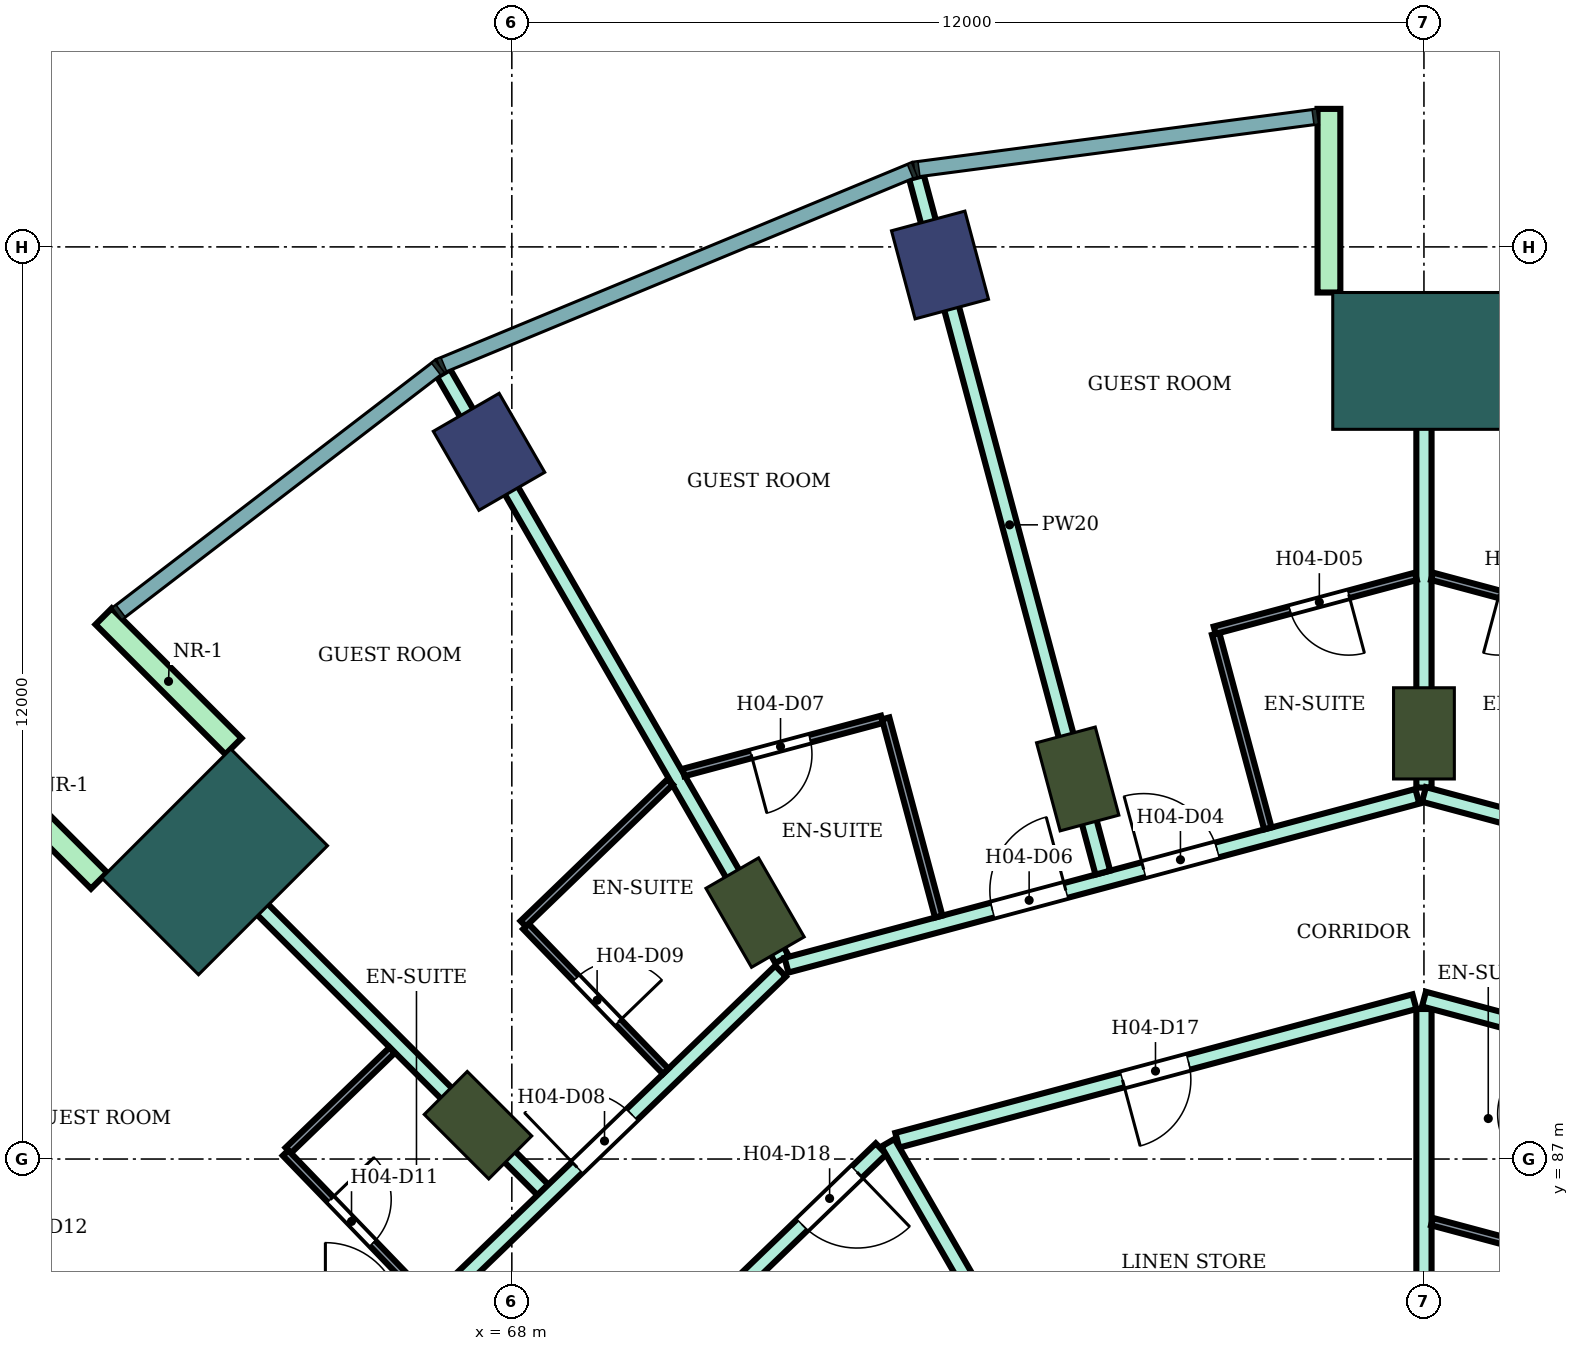
"""IFC4 building model, lengths in metres.
Left out: names, types, materials, properties, quantities, classifications, styles, units other than length and angle.
Written with IfcOpenShell. Run it as: python <this file> out.ifc"""

import sys

from ifc_helpers import new_model, si_unit, direction, frame, frame_2d, origin, origin_2d, place, context, subcontext, project, spatial, rectangle, extrude, element, fill, save


model = new_model("IFC4")
c1 = context("Model", 3, precision=1e-05, world=origin(), true_north=direction((0.0, 1.0)))
c2 = subcontext(c1, "Body", "Model", "MODEL_VIEW")
j1 = project(units=[si_unit("LENGTHUNIT", "METRE"), si_unit("PLANEANGLEUNIT", "RADIAN")], contexts=[c1])
p1 = place(None, origin())
s1 = spatial("IfcSite", under=j1, at=p1, CompositionType="ELEMENT")
p2 = place(p1, origin())
s2 = spatial("IfcBuilding", under=s1, at=p2, CompositionType="ELEMENT")
p3 = place(p2, frame((0.0, 0.0, 66.8)))
s3 = spatial("IfcBuildingStorey", under=s2, at=p3, CompositionType="ELEMENT", Elevation=66.8)
for number, where, z_axis, x_axis in (
    (1, (73.633, 98.762, 0.0), (0.0, 0.0, 1.0), (-0.259, 0.966, 0.0)),
    (2, (67.7, 96.304, 0.0), (0.0, 0.0, 1.0), (-0.5, 0.866, 0.0)),
):
    element("IfcColumn", number, at=place(p3, frame(where, z_axis=z_axis, x_axis=x_axis)), inside=s3, PredefinedType="COLUMN", context=c2, shape_type="SweptSolid", body=[
        extrude(rectangle(XDim=1.2, YDim=1.0, at=origin_2d()), origin(), (0.0, 0.0, 1.0), 3.8),
    ])
for number, where, z_axis, x_axis in (
    (3, (80.0, 92.6, 0.0), (0.0, 0.0, 1.0), (0.0, 1.0, 0.0)),
    (4, (75.445, 92.0, 0.0), (0.0, 0.0, 1.0), (-0.259, 0.966, 0.0)),
    (5, (71.2, 90.242, 0.0), (0.0, 0.0, 1.0), (-0.5, 0.866, 0.0)),
    (6, (67.555, 87.445, 0.0), (0.0, 0.0, 1.0), (-0.707, 0.707, 0.0)),
):
    element("IfcColumn", number, at=place(p3, frame(where, z_axis=z_axis, x_axis=x_axis)), inside=s3, PredefinedType="COLUMN", context=c2, shape_type="SweptSolid", body=[
        extrude(rectangle(XDim=1.2, YDim=0.8, at=origin_2d()), origin(), (0.0, 0.0, 1.0), 3.8),
    ])
for number, where, z_axis, x_axis in (
    (7, (80.0, 97.5, 0.0), (0.0, 0.0, 1.0), (0.0, 1.0, 0.0)),
    (8, (64.09, 90.91, 0.0), (0.0, 0.0, 1.0), (-0.707, 0.707, 0.0)),
):
    element("IfcColumn", number, at=place(p3, frame(where, z_axis=z_axis, x_axis=x_axis)), inside=s3, PredefinedType="COLUMN", context=c2, shape_type="SweptSolid", body=[
        extrude(rectangle(XDim=1.8, YDim=2.4, at=origin_2d()), origin(), (0.0, 0.0, 1.0), 3.8),
    ])
for number, where, z_axis, x_axis in (
    (9, (78.75, 98.4, 0.0), (0.0, 0.0, 1.0), (0.0, 1.0, 0.0)),
    (10, (64.338, 92.43, 0.0), (0.0, 0.0, 1.0), (-0.707, 0.707, 0.0)),
    (11, (62.57, 90.662, 0.0), (0.0, 0.0, 1.0), (-0.707, 0.707, 0.0)),
):
    element("IfcWall", number, at=place(p3, frame(where, z_axis=z_axis, x_axis=x_axis)), inside=s3, PredefinedType="NOTDEFINED", context=c2, shape_type="SweptSolid", body=[
        extrude(rectangle(XDim=2.416, YDim=0.3, at=frame_2d((1.208, 0.0))), origin(), (0.0, 0.0, 1.0), 3.8),
    ])
p4 = place(p3, frame((63.598, 91.407, 0.0), z_axis=(0.0, 0.0, 1.0), x_axis=(0.706981202484, -0.707232337591, 0.0)))
e12 = element("IfcWall", 12, at=p4, inside=s3, PredefinedType="PARTITIONING", context=c2, shape_type="SweptSolid", body=[
    extrude(rectangle(XDim=6.805, YDim=0.2, at=frame_2d((3.402, 0.0))), origin(), (0.0, 0.0, 1.0), 3.35),
])
p5 = place(p3, frame((66.797, 84.9, 0.0), z_axis=(0.0, 0.0, 1.0), x_axis=(0.719692092412, 0.694293376116, 0.0)))
e13 = element("IfcWall", 13, at=p5, inside=s3, PredefinedType="PARTITIONING", context=c2, shape_type="SweptSolid", body=[
    extrude(rectangle(XDim=6.584, YDim=0.2, at=frame_2d((3.292, 0.0))), origin(), (0.0, 0.0, 1.0), 3.35),
])
p6 = place(p5, frame((2.866, 0.0, 0.0)))
e14 = element("IfcOpeningElement", 14, at=p6, cuts=e13, PredefinedType="OPENING", context=c2, shape_type="SweptSolid", body=[
    extrude(rectangle(XDim=1.0, YDim=2.1, at=frame_2d((0.5, 1.05))), frame((0.0, 0.11, 0.0), z_axis=(0.0, -1.0, 0.0), x_axis=(1.0, 0.0, 0.0)), (0.0, 0.0, 1.0), 0.22),
])
p7 = place(p3, frame((67.101, 97.342, 0.0), z_axis=(0.0, 0.0, 1.0), x_axis=(0.499932813297, -0.866064190571, 0.0)))
e15 = element("IfcWall", 15, at=p7, inside=s3, PredefinedType="PARTITIONING", context=c2, shape_type="SweptSolid", body=[
    extrude(rectangle(XDim=8.908, YDim=0.2, at=frame_2d((4.454, 0.0))), origin(), (0.0, 0.0, 1.0), 3.35),
])
p8 = place(p3, frame((68.987, 83.4, 0.0), z_axis=(0.0, 0.0, 1.0), x_axis=(0.719591503389, 0.694397629784, 0.0)))
e16 = element("IfcWall", 16, at=p8, inside=s3, PredefinedType="PARTITIONING", context=c2, shape_type="SweptSolid", body=[
    extrude(rectangle(XDim=5.378, YDim=0.2, at=frame_2d((2.689, 0.0))), origin(), (0.0, 0.0, 1.0), 3.35),
])
p9 = place(p8, frame((3.938, 0.0, 0.0)))
e17 = element("IfcOpeningElement", 17, at=p9, cuts=e16, PredefinedType="OPENING", context=c2, shape_type="SweptSolid", body=[
    extrude(rectangle(XDim=1.0, YDim=2.1, at=frame_2d((0.5, 1.05))), frame((0.0, 0.11, 0.0), z_axis=(0.0, -1.0, 0.0), x_axis=(1.0, 0.0, 0.0)), (0.0, 0.0, 1.0), 0.22),
])
p10 = place(p3, frame((71.614, 89.55, 0.0), z_axis=(0.0, 0.0, 1.0), x_axis=(0.965982156828, 0.258608725086, 0.0)))
e18 = element("IfcWall", 18, at=p10, inside=s3, PredefinedType="PARTITIONING", context=c2, shape_type="SweptSolid", body=[
    extrude(rectangle(XDim=8.592, YDim=0.2, at=frame_2d((4.296, 0.0))), origin(), (0.0, 0.0, 1.0), 3.35),
])
p11 = place(p10, frame((4.865, 0.0, 0.0)))
e19 = element("IfcOpeningElement", 19, at=p11, cuts=e18, PredefinedType="OPENING", context=c2, shape_type="SweptSolid", body=[
    extrude(rectangle(XDim=1.0, YDim=2.1, at=frame_2d((0.5, 1.05))), frame((0.0, 0.11, 0.0), z_axis=(0.0, -1.0, 0.0), x_axis=(1.0, 0.0, 0.0)), (0.0, 0.0, 1.0), 0.22),
])
p12 = place(p10, frame((2.804, 0.0, 0.0)))
e20 = element("IfcOpeningElement", 20, at=p12, cuts=e18, PredefinedType="OPENING", context=c2, shape_type="SweptSolid", body=[
    extrude(rectangle(XDim=1.0, YDim=2.1, at=frame_2d((0.5, 1.05))), frame((0.0, 0.11, 0.0), z_axis=(0.0, -1.0, 0.0), x_axis=(1.0, 0.0, 0.0)), (0.0, 0.0, 1.0), 0.22),
])
p13 = place(p3, frame((73.071, 87.247, 0.0), z_axis=(0.0, 0.0, 1.0), x_axis=(0.965914318977, 0.258861987157, 0.0)))
e21 = element("IfcWall", 21, at=p13, inside=s3, PredefinedType="PARTITIONING", context=c2, shape_type="SweptSolid", body=[
    extrude(rectangle(XDim=7.043, YDim=0.2, at=frame_2d((3.521, 0.0))), origin(), (0.0, 0.0, 1.0), 3.35),
])
p14 = place(p13, frame((3.067, 0.0, 0.0)))
e22 = element("IfcOpeningElement", 22, at=p14, cuts=e21, PredefinedType="OPENING", context=c2, shape_type="SweptSolid", body=[
    extrude(rectangle(XDim=0.9, YDim=2.1, at=frame_2d((0.45, 1.05))), frame((0.0, 0.11, 0.0), z_axis=(0.0, -1.0, 0.0), x_axis=(1.0, 0.0, 0.0)), (0.0, 0.0, 1.0), 0.22),
])
p15 = place(p3, frame((72.948, 87.214, 0.0), z_axis=(0.0, 0.0, 1.0), x_axis=(0.499927021214, -0.866067534006, 0.0)))
e23 = element("IfcWall", 23, at=p15, inside=s3, PredefinedType="PARTITIONING", context=c2, shape_type="SweptSolid", body=[
    extrude(rectangle(XDim=6.405, YDim=0.2, at=frame_2d((3.203, 0.0))), origin(), (0.0, 0.0, 1.0), 3.35),
])
p16 = place(p3, frame((73.323, 99.919, 0.0), z_axis=(0.0, 0.0, 1.0), x_axis=(0.258817230439, -0.965926312525, 0.0)))
e24 = element("IfcWall", 24, at=p16, inside=s3, PredefinedType="PARTITIONING", context=c2, shape_type="SweptSolid", body=[
    extrude(rectangle(XDim=9.474, YDim=0.2, at=frame_2d((4.737, 0.0))), origin(), (0.0, 0.0, 1.0), 3.35),
])
p17 = place(p3, frame((80.0, 82.699, 0.0), z_axis=(0.0, 0.0, 1.0), x_axis=(0.0, 1.0, 0.0)))
e25 = element("IfcWall", 25, at=p17, inside=s3, PredefinedType="PARTITIONING", context=c2, shape_type="SweptSolid", body=[
    extrude(rectangle(XDim=6.275, YDim=0.2, at=frame_2d((3.138, 0.0))), origin(), (0.0, 0.0, 1.0), 3.35),
])
p18 = place(p3, frame((80.0, 89.104, 0.0), z_axis=(0.0, 0.0, 1.0), x_axis=(0.965854247166, -0.25908603442, 0.0)))
e26 = element("IfcWall", 26, at=p18, inside=s3, PredefinedType="PARTITIONING", context=c2, shape_type="SweptSolid", body=[
    extrude(rectangle(XDim=7.183, YDim=0.2, at=frame_2d((3.592, 0.0))), origin(), (0.0, 0.0, 1.0), 3.35),
])
p19 = place(p18, frame((5.763, 0.0, 0.0)))
e27 = element("IfcOpeningElement", 27, at=p19, cuts=e26, PredefinedType="OPENING", context=c2, shape_type="SweptSolid", body=[
    extrude(rectangle(XDim=1.0, YDim=2.1, at=frame_2d((0.5, 1.05))), frame((0.0, 0.11, 0.0), z_axis=(0.0, -1.0, 0.0), x_axis=(1.0, 0.0, 0.0)), (0.0, 0.0, 1.0), 0.22),
])
p20 = place(p3, frame((80.0, 91.886, 0.0), z_axis=(0.0, 0.0, 1.0), x_axis=(0.0, 1.0, 0.0)))
e28 = element("IfcWall", 28, at=p20, inside=s3, PredefinedType="PARTITIONING", context=c2, shape_type="SweptSolid", body=[
    extrude(rectangle(XDim=6.314, YDim=0.2, at=frame_2d((3.157, 0.0))), origin(), (0.0, 0.0, 1.0), 3.35),
])
p21 = place(p3, frame((80.0, 91.796, 0.0), z_axis=(0.0, 0.0, 1.0), x_axis=(0.965891796243, -0.258946013582, 0.0)))
e29 = element("IfcWall", 29, at=p21, inside=s3, PredefinedType="PARTITIONING", context=c2, shape_type="SweptSolid", body=[
    extrude(rectangle(XDim=8.642, YDim=0.2, at=frame_2d((4.321, 0.0))), origin(), (0.0, 0.0, 1.0), 3.35),
])
p22 = place(p21, frame((2.817, 0.0, 0.0)))
e30 = element("IfcOpeningElement", 30, at=p22, cuts=e29, PredefinedType="OPENING", context=c2, shape_type="SweptSolid", body=[
    extrude(rectangle(XDim=1.0, YDim=2.1, at=frame_2d((0.5, 1.05))), frame((0.0, 0.11, 0.0), z_axis=(0.0, -1.0, 0.0), x_axis=(1.0, 0.0, 0.0)), (0.0, 0.0, 1.0), 0.22),
])
p23 = place(p3, frame((57.659, 87.899, 0.0), z_axis=(0.0, 0.0, 1.0), x_axis=(0.86602264145, -0.500004784474, 0.0)))
e31 = element("IfcWall", 31, at=p23, inside=s3, PredefinedType="PARTITIONING", context=c2, shape_type="SweptSolid", body=[
    extrude(rectangle(XDim=8.708, YDim=0.1, at=frame_2d((4.354, 0.0))), origin(), (0.0, 0.0, 1.0), 3.35),
])
p24 = place(p23, frame((3.929, 0.0, 0.0)))
e32 = element("IfcOpeningElement", 32, at=p24, cuts=e31, PredefinedType="OPENING", context=c2, shape_type="SweptSolid", body=[
    extrude(rectangle(XDim=0.9, YDim=2.1, at=frame_2d((0.45, 1.05))), frame((0.0, 0.06, 0.0), z_axis=(0.0, -1.0, 0.0), x_axis=(1.0, 0.0, 0.0)), (0.0, 0.0, 1.0), 0.12),
])
p25 = place(p3, frame((65.059, 87.114, 0.0), z_axis=(0.0, 0.0, 1.0), x_axis=(0.719715847356, 0.694268751324, 0.0)))
e33 = element("IfcWall", 33, at=p25, inside=s3, PredefinedType="PARTITIONING", context=c2, shape_type="SweptSolid", body=[
    extrude(rectangle(XDim=1.9, YDim=0.1, at=frame_2d((0.95, 0.0))), origin(), (0.0, 0.0, 1.0), 3.35),
])
p26 = place(p3, frame((65.023, 87.079, 0.0), z_axis=(0.0, 0.0, 1.0), x_axis=(0.694287838235, -0.719697434815, 0.0)))
e34 = element("IfcWall", 34, at=p26, inside=s3, PredefinedType="PARTITIONING", context=c2, shape_type="SweptSolid", body=[
    extrude(rectangle(XDim=2.7, YDim=0.1, at=frame_2d((1.35, 0.0))), origin(), (0.0, 0.0, 1.0), 3.35),
])
p27 = place(p26, frame((0.85, 0.0, 0.0)))
e35 = element("IfcOpeningElement", 35, at=p27, cuts=e34, PredefinedType="OPENING", context=c2, shape_type="SweptSolid", body=[
    extrude(rectangle(XDim=0.8, YDim=2.1, at=frame_2d((0.4, 1.05))), frame((0.0, 0.06, 0.0), z_axis=(0.0, -1.0, 0.0), x_axis=(1.0, 0.0, 0.0)), (0.0, 0.0, 1.0), 0.12),
])
p28 = place(p3, frame((68.185, 90.06, 0.0), z_axis=(0.0, 0.0, 1.0), x_axis=(0.69446127412, -0.719530081892, 0.0)))
e36 = element("IfcWall", 36, at=p28, inside=s3, PredefinedType="PARTITIONING", context=c2, shape_type="SweptSolid", body=[
    extrude(rectangle(XDim=2.649, YDim=0.1, at=frame_2d((1.324, 0.0))), origin(), (0.0, 0.0, 1.0), 3.35),
])
p29 = place(p28, frame((0.95, 0.0, 0.0)))
e37 = element("IfcOpeningElement", 37, at=p29, cuts=e36, PredefinedType="OPENING", context=c2, shape_type="SweptSolid", body=[
    extrude(rectangle(XDim=0.8, YDim=2.1, at=frame_2d((0.4, 1.05))), frame((0.0, 0.06, 0.0), z_axis=(0.0, -1.0, 0.0), x_axis=(1.0, 0.0, 0.0)), (0.0, 0.0, 1.0), 0.12),
])
p30 = place(p3, frame((68.15, 90.096, 0.0), z_axis=(0.0, 0.0, 1.0), x_axis=(0.719669144226, 0.694317163009, 0.0)))
e38 = element("IfcWall", 38, at=p30, inside=s3, PredefinedType="PARTITIONING", context=c2, shape_type="SweptSolid", body=[
    extrude(rectangle(XDim=2.687, YDim=0.1, at=frame_2d((1.343, 0.0))), origin(), (0.0, 0.0, 1.0), 3.35),
])
p31 = place(p3, frame((70.258, 92.085, 0.0), z_axis=(0.0, 0.0, 1.0), x_axis=(0.965948051503, 0.258736085224, 0.0)))
e39 = element("IfcWall", 39, at=p31, inside=s3, PredefinedType="PARTITIONING", context=c2, shape_type="SweptSolid", body=[
    extrude(rectangle(XDim=2.703, YDim=0.1, at=frame_2d((1.352, 0.0))), origin(), (0.0, 0.0, 1.0), 3.35),
])
p32 = place(p31, frame((0.922, 0.0, 0.0)))
e40 = element("IfcOpeningElement", 40, at=p32, cuts=e39, PredefinedType="OPENING", context=c2, shape_type="SweptSolid", body=[
    extrude(rectangle(XDim=0.8, YDim=2.1, at=frame_2d((0.4, 1.05))), frame((0.0, 0.06, 0.0), z_axis=(0.0, -1.0, 0.0), x_axis=(1.0, 0.0, 0.0)), (0.0, 0.0, 1.0), 0.12),
])
p33 = place(p3, frame((72.918, 92.797, 0.0), z_axis=(0.0, 0.0, 1.0), x_axis=(0.25867580527, -0.965964195904, 0.0)))
e41 = element("IfcWall", 41, at=p33, inside=s3, PredefinedType="PARTITIONING", context=c2, shape_type="SweptSolid", body=[
    extrude(rectangle(XDim=2.699, YDim=0.1, at=frame_2d((1.35, 0.0))), origin(), (0.0, 0.0, 1.0), 3.35),
])
p34 = place(p3, frame((77.26, 93.909, 0.0), z_axis=(0.0, 0.0, 1.0), x_axis=(0.258935674139, -0.965894568086, 0.0)))
e42 = element("IfcWall", 42, at=p34, inside=s3, PredefinedType="PARTITIONING", context=c2, shape_type="SweptSolid", body=[
    extrude(rectangle(XDim=2.649, YDim=0.1, at=frame_2d((1.325, 0.0))), origin(), (0.0, 0.0, 1.0), 3.35),
])
p35 = place(p3, frame((77.247, 93.957, 0.0), z_axis=(0.0, 0.0, 1.0), x_axis=(0.965922199757, 0.258832579125, 0.0)))
e43 = element("IfcWall", 43, at=p35, inside=s3, PredefinedType="PARTITIONING", context=c2, shape_type="SweptSolid", body=[
    extrude(rectangle(XDim=2.74, YDim=0.1, at=frame_2d((1.37, 0.0))), origin(), (0.0, 0.0, 1.0), 3.35),
])
p36 = place(p35, frame((1.025, 0.0, 0.0)))
e44 = element("IfcOpeningElement", 44, at=p36, cuts=e43, PredefinedType="OPENING", context=c2, shape_type="SweptSolid", body=[
    extrude(rectangle(XDim=0.8, YDim=2.1, at=frame_2d((0.4, 1.05))), frame((0.0, 0.06, 0.0), z_axis=(0.0, -1.0, 0.0), x_axis=(1.0, 0.0, 0.0)), (0.0, 0.0, 1.0), 0.12),
])
p37 = place(p3, frame((80.106, 86.177, 0.0), z_axis=(0.0, 0.0, 1.0), x_axis=(0.966002973184, -0.258530957139, 0.0)))
e45 = element("IfcWall", 45, at=p37, inside=s3, PredefinedType="PARTITIONING", context=c2, shape_type="SweptSolid", body=[
    extrude(rectangle(XDim=1.19, YDim=0.1, at=frame_2d((0.595, 0.0))), origin(), (0.0, 0.0, 1.0), 3.35),
])
p38 = place(p3, frame((80.106, 94.667, 0.0), z_axis=(0.0, 0.0, 1.0), x_axis=(0.96589821458, -0.258922071427, 0.0)))
e46 = element("IfcWall", 46, at=p38, inside=s3, PredefinedType="PARTITIONING", context=c2, shape_type="SweptSolid", body=[
    extrude(rectangle(XDim=2.69, YDim=0.1, at=frame_2d((1.345, 0.0))), origin(), (0.0, 0.0, 1.0), 3.35),
])
p39 = place(p38, frame((0.915, 0.0, 0.0)))
e47 = element("IfcOpeningElement", 47, at=p39, cuts=e46, PredefinedType="OPENING", context=c2, shape_type="SweptSolid", body=[
    extrude(rectangle(XDim=0.8, YDim=2.1, at=frame_2d((0.4, 1.05))), frame((0.0, 0.06, 0.0), z_axis=(0.0, -1.0, 0.0), x_axis=(1.0, 0.0, 0.0)), (0.0, 0.0, 1.0), 0.12),
])
p40 = place(p39, frame((0.8, 0.0, 0.0), z_axis=(0.0, 0.0, 1.0), x_axis=(-1.0, 0.0, 0.0)))
e48 = element("IfcDoor", 48, at=p40, inside=s3, OperationType="SINGLE_SWING_RIGHT", PredefinedType="DOOR", context=c2, shape_type="SweptSolid", body=[
    extrude(rectangle(XDim=0.8, YDim=2.1, at=frame_2d((0.4, 1.05))), frame((0.0, 0.025, 0.0), z_axis=(0.0, -1.0, 0.0), x_axis=(1.0, 0.0, 0.0)), (0.0, 0.0, 1.0), 0.05),
])
fill(e47, e48)
p41 = place(p11, origin())
e49 = element("IfcDoor", 49, at=p41, inside=s3, OperationType="SINGLE_SWING_LEFT", PredefinedType="DOOR", context=c2, shape_type="SweptSolid", body=[
    extrude(rectangle(XDim=1.0, YDim=2.1, at=frame_2d((0.5, 1.05))), frame((0.0, 0.025, 0.0), z_axis=(0.0, -1.0, 0.0), x_axis=(1.0, 0.0, 0.0)), (0.0, 0.0, 1.0), 0.05),
])
fill(e19, e49)
p42 = place(p36, frame((0.8, 0.0, 0.0), z_axis=(0.0, 0.0, 1.0), x_axis=(-1.0, 0.0, 0.0)))
e50 = element("IfcDoor", 50, at=p42, inside=s3, OperationType="SINGLE_SWING_LEFT", PredefinedType="DOOR", context=c2, shape_type="SweptSolid", body=[
    extrude(rectangle(XDim=0.8, YDim=2.1, at=frame_2d((0.4, 1.05))), frame((0.0, 0.025, 0.0), z_axis=(0.0, -1.0, 0.0), x_axis=(1.0, 0.0, 0.0)), (0.0, 0.0, 1.0), 0.05),
])
fill(e44, e50)
p43 = place(p12, origin())
e51 = element("IfcDoor", 51, at=p43, inside=s3, OperationType="SINGLE_SWING_RIGHT", PredefinedType="DOOR", context=c2, shape_type="SweptSolid", body=[
    extrude(rectangle(XDim=1.0, YDim=2.1, at=frame_2d((0.5, 1.05))), frame((0.0, 0.025, 0.0), z_axis=(0.0, -1.0, 0.0), x_axis=(1.0, 0.0, 0.0)), (0.0, 0.0, 1.0), 0.05),
])
fill(e20, e51)
p44 = place(p32, frame((0.8, 0.0, 0.0), z_axis=(0.0, 0.0, 1.0), x_axis=(-1.0, 0.0, 0.0)))
e52 = element("IfcDoor", 52, at=p44, inside=s3, OperationType="SINGLE_SWING_RIGHT", PredefinedType="DOOR", context=c2, shape_type="SweptSolid", body=[
    extrude(rectangle(XDim=0.8, YDim=2.1, at=frame_2d((0.4, 1.05))), frame((0.0, 0.025, 0.0), z_axis=(0.0, -1.0, 0.0), x_axis=(1.0, 0.0, 0.0)), (0.0, 0.0, 1.0), 0.05),
])
fill(e40, e52)
p45 = place(p6, origin())
e53 = element("IfcDoor", 53, at=p45, inside=s3, OperationType="SINGLE_SWING_LEFT", PredefinedType="DOOR", context=c2, shape_type="SweptSolid", body=[
    extrude(rectangle(XDim=1.0, YDim=2.1, at=frame_2d((0.5, 1.05))), frame((0.0, 0.025, 0.0), z_axis=(0.0, -1.0, 0.0), x_axis=(1.0, 0.0, 0.0)), (0.0, 0.0, 1.0), 0.05),
])
fill(e14, e53)
p46 = place(p29, origin())
e54 = element("IfcDoor", 54, at=p46, inside=s3, OperationType="SINGLE_SWING_RIGHT", PredefinedType="DOOR", context=c2, shape_type="SweptSolid", body=[
    extrude(rectangle(XDim=0.8, YDim=2.1, at=frame_2d((0.4, 1.05))), frame((0.0, 0.025, 0.0), z_axis=(0.0, -1.0, 0.0), x_axis=(1.0, 0.0, 0.0)), (0.0, 0.0, 1.0), 0.05),
])
fill(e37, e54)
p47 = place(p27, origin())
e55 = element("IfcDoor", 55, at=p47, inside=s3, OperationType="SINGLE_SWING_LEFT", PredefinedType="DOOR", context=c2, shape_type="SweptSolid", body=[
    extrude(rectangle(XDim=0.8, YDim=2.1, at=frame_2d((0.4, 1.05))), frame((0.0, 0.025, 0.0), z_axis=(0.0, -1.0, 0.0), x_axis=(1.0, 0.0, 0.0)), (0.0, 0.0, 1.0), 0.05),
])
fill(e35, e55)
p48 = place(p14, frame((0.9, 0.0, 0.0), z_axis=(0.0, 0.0, 1.0), x_axis=(-1.0, 0.0, 0.0)))
e56 = element("IfcDoor", 56, at=p48, inside=s3, OperationType="SINGLE_SWING_RIGHT", PredefinedType="DOOR", context=c2, shape_type="SweptSolid", body=[
    extrude(rectangle(XDim=0.9, YDim=2.1, at=frame_2d((0.45, 1.05))), frame((0.0, 0.025, 0.0), z_axis=(0.0, -1.0, 0.0), x_axis=(1.0, 0.0, 0.0)), (0.0, 0.0, 1.0), 0.05),
])
fill(e22, e56)
p49 = place(p9, frame((1.0, 0.0, 0.0), z_axis=(0.0, 0.0, 1.0), x_axis=(-1.0, 0.0, 0.0)))
e57 = element("IfcDoor", 57, at=p49, inside=s3, OperationType="SINGLE_SWING_LEFT", PredefinedType="DOOR", context=c2, shape_type="SweptSolid", body=[
    extrude(rectangle(XDim=1.0, YDim=2.1, at=frame_2d((0.5, 1.05))), frame((0.0, 0.025, 0.0), z_axis=(0.0, -1.0, 0.0), x_axis=(1.0, 0.0, 0.0)), (0.0, 0.0, 1.0), 0.05),
])
fill(e17, e57)
save(model, sys.argv[1])
